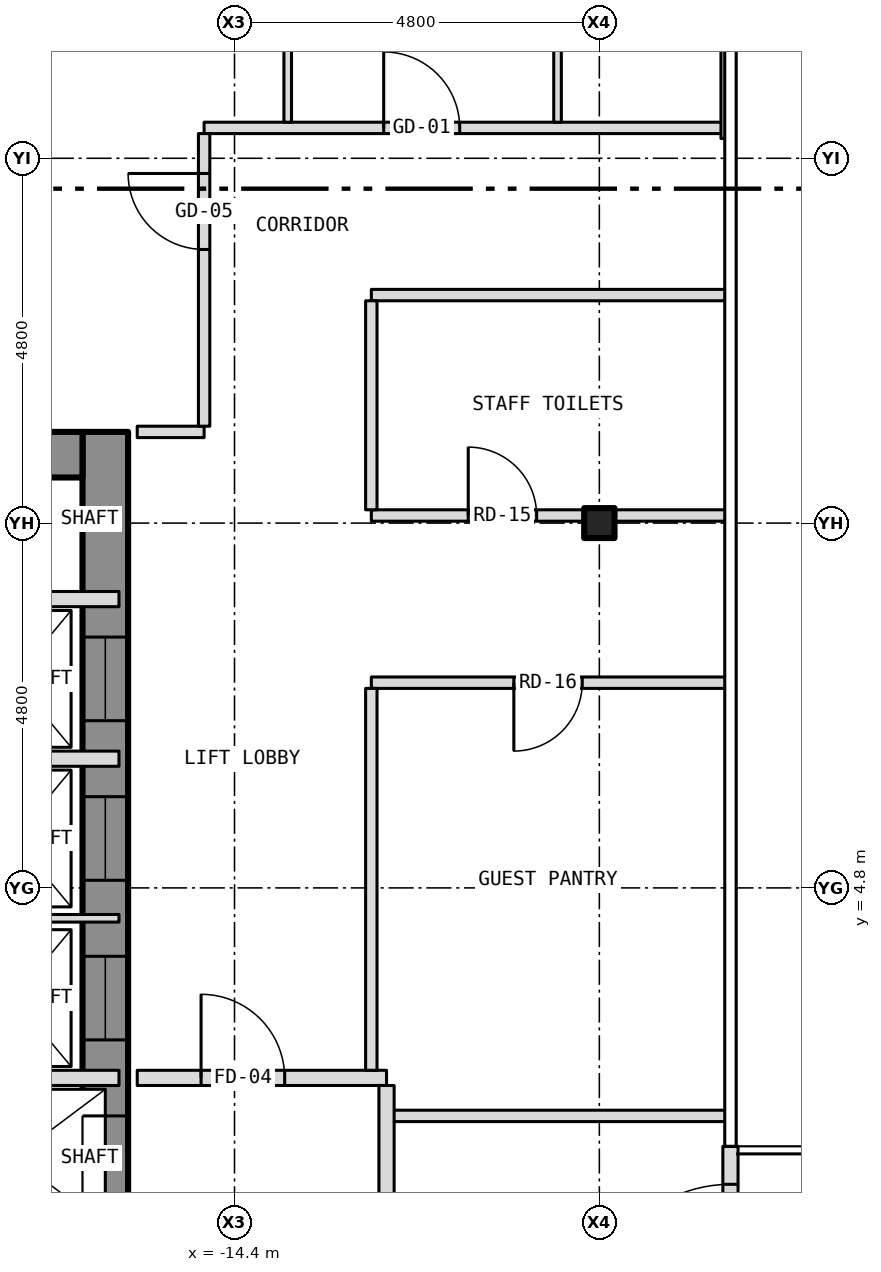
"""IFC4 building model, lengths in metres.
Left out: names, types, materials, properties, quantities, classifications, styles, units other than length and angle.
Written with IfcOpenShell. Run it as: python <this file> out.ifc"""

import sys

from ifc_helpers import new_model, si_unit, direction, frame, frame_2d, origin, origin_2d, place, context, subcontext, project, spatial, rectangle, i_section, extrude, element, fill, save


model = new_model("IFC4")
c1 = context("Model", 3, precision=1e-05, world=origin(), true_north=direction((0.0, 1.0)))
c2 = subcontext(c1, "Body", "Model", "MODEL_VIEW")
j1 = project(units=[si_unit("LENGTHUNIT", "METRE"), si_unit("PLANEANGLEUNIT", "RADIAN")], contexts=[c1])
p1 = place(None, origin())
s1 = spatial("IfcSite", under=j1, at=p1, CompositionType="ELEMENT")
p2 = place(p1, origin())
s2 = spatial("IfcBuilding", under=s1, at=p2, CompositionType="ELEMENT")
p3 = place(p2, frame((0.0, 0.0, 134.5)))
s3 = spatial("IfcBuildingStorey", under=s2, at=p3, CompositionType="ELEMENT", Elevation=134.5)
p4 = place(p3, frame((-9.6, 9.6, -0.15), z_axis=(0.0, 0.0, 1.0), x_axis=(1.0, 0.0, 0.0)))
e1 = element("IfcColumn", 1, at=p4, inside=s3, PredefinedType="COLUMN", context=c2, shape_type="SweptSolid", body=[
    extrude(i_section(OverallWidth=0.399, OverallDepth=0.394, WebThickness=0.023, FlangeThickness=0.037, at=origin_2d()), origin(), (0.0, 0.0, 1.0), 3.35),
])
p5 = place(p3, frame((-16.1, -10.8, 0.0), z_axis=(0.0, 0.0, 1.0), x_axis=(0.0, 1.0, 0.0)))
e2 = element("IfcWall", 2, at=p5, inside=s3, PredefinedType="SHEAR", context=c2, shape_type="SweptSolid", body=[
    extrude(rectangle(XDim=21.6, YDim=0.6, at=frame_2d((10.8, 0.0))), origin(), (0.0, 0.0, 1.0), 2.9),
])
p6 = place(p5, frame((9.4, 0.0, 0.0)))
e3 = element("IfcOpeningElement", 3, at=p6, cuts=e2, PredefinedType="OPENING", context=c2, shape_type="SweptSolid", body=[
    extrude(rectangle(XDim=1.1, YDim=2.1, at=frame_2d((0.55, 1.05))), frame((0.0, 0.312, 0.0), z_axis=(0.0, -1.0, 0.0), x_axis=(1.0, 0.0, 0.0)), (0.0, 0.0, 1.0), 0.624),
])
p7 = place(p5, frame((11.5, 0.0, 0.0)))
e4 = element("IfcOpeningElement", 4, at=p7, cuts=e2, PredefinedType="OPENING", context=c2, shape_type="SweptSolid", body=[
    extrude(rectangle(XDim=1.1, YDim=2.1, at=frame_2d((0.55, 1.05))), frame((0.0, 0.312, 0.0), z_axis=(0.0, -1.0, 0.0), x_axis=(1.0, 0.0, 0.0)), (0.0, 0.0, 1.0), 0.624),
])
p8 = place(p5, frame((13.6, 0.0, 0.0)))
e5 = element("IfcOpeningElement", 5, at=p8, cuts=e2, PredefinedType="OPENING", context=c2, shape_type="SweptSolid", body=[
    extrude(rectangle(XDim=1.1, YDim=2.1, at=frame_2d((0.55, 1.05))), frame((0.0, 0.312, 0.0), z_axis=(0.0, -1.0, 0.0), x_axis=(1.0, 0.0, 0.0)), (0.0, 0.0, 1.0), 0.624),
])
p9 = place(p5, frame((15.7, 0.0, 0.0)))
e6 = element("IfcOpeningElement", 6, at=p9, cuts=e2, PredefinedType="OPENING", context=c2, shape_type="SweptSolid", body=[
    extrude(rectangle(XDim=1.1, YDim=2.1, at=frame_2d((0.55, 1.05))), frame((0.0, 0.312, 0.0), z_axis=(0.0, -1.0, 0.0), x_axis=(1.0, 0.0, 0.0)), (0.0, 0.0, 1.0), 0.624),
])
p10 = place(p5, frame((17.8, 0.0, 0.0)))
e7 = element("IfcOpeningElement", 7, at=p10, cuts=e2, PredefinedType="OPENING", context=c2, shape_type="SweptSolid", body=[
    extrude(rectangle(XDim=1.1, YDim=2.1, at=frame_2d((0.55, 1.05))), frame((0.0, 0.312, 0.0), z_axis=(0.0, -1.0, 0.0), x_axis=(1.0, 0.0, 0.0)), (0.0, 0.0, 1.0), 0.624),
])
p11 = place(p5, frame((0.758, 0.0, 0.0)))
e8 = element("IfcOpeningElement", 8, at=p11, cuts=e2, PredefinedType="OPENING", context=c2, shape_type="SweptSolid", body=[
    extrude(rectangle(XDim=1.1, YDim=2.1, at=frame_2d((0.55, 1.05))), frame((0.0, 0.312, 0.0), z_axis=(0.0, -1.0, 0.0), x_axis=(1.0, 0.0, 0.0)), (0.0, 0.0, 1.0), 0.624),
])
p12 = place(p5, frame((7.5, 0.0, 0.0)))
e9 = element("IfcOpeningElement", 9, at=p12, cuts=e2, PredefinedType="OPENING", context=c2, shape_type="SweptSolid", body=[
    extrude(rectangle(XDim=1.1, YDim=2.1, at=frame_2d((0.55, 1.05))), frame((0.0, 0.312, 0.0), z_axis=(0.0, -1.0, 0.0), x_axis=(1.0, 0.0, 0.0)), (0.0, 0.0, 1.0), 0.624),
])
p13 = place(p3, frame((-22.2, 10.5, 0.0), z_axis=(0.0, 0.0, 1.0), x_axis=(1.0, 0.0, 0.0)))
e10 = element("IfcWall", 10, at=p13, inside=s3, PredefinedType="SHEAR", context=c2, shape_type="SweptSolid", body=[
    extrude(rectangle(XDim=5.8, YDim=0.6, at=frame_2d((2.9, 0.0))), origin(), (0.0, 0.0, 1.0), 2.9),
])
p14 = place(p3, frame((-7.875, -1.4, 0.0), z_axis=(0.0, 0.0, 1.0), x_axis=(0.0, 1.0, 0.0)))
e11 = element("IfcWall", 11, at=p14, inside=s3, PredefinedType="SOLIDWALL", context=c2, shape_type="SweptSolid", body=[
    extrude(rectangle(XDim=2.8, YDim=0.2, at=frame_2d((1.4, 0.0))), origin(), (0.0, 0.0, 1.0), 3.5),
])
p15 = place(p14, frame((0.5, 0.0, 0.0)))
e12 = element("IfcOpeningElement", 12, at=p15, cuts=e11, PredefinedType="OPENING", context=c2, shape_type="SweptSolid", body=[
    extrude(rectangle(XDim=1.8, YDim=2.1, at=frame_2d((0.9, 1.05))), frame((0.0, 0.112, 0.0), z_axis=(0.0, -1.0, 0.0), x_axis=(1.0, 0.0, 0.0)), (0.0, 0.0, 1.0), 0.224),
])
p16 = place(p3, frame((-12.4, 1.8, 0.0), z_axis=(0.0, 0.0, 1.0), x_axis=(1.0, 0.0, 0.0)))
e13 = element("IfcWall", 13, at=p16, inside=s3, PredefinedType="PARTITIONING", context=c2, shape_type="SweptSolid", body=[
    extrude(rectangle(XDim=4.48, YDim=0.15, at=frame_2d((2.24, 0.0))), origin(), (0.0, 0.0, 1.0), 3.2),
])
p17 = place(p3, frame((-18.8, 2.3, 0.0), z_axis=(0.0, 0.0, 1.0), x_axis=(1.0, 0.0, 0.0)))
e14 = element("IfcWall", 14, at=p17, inside=s3, PredefinedType="PARTITIONING", context=c2, shape_type="SweptSolid", body=[
    extrude(rectangle(XDim=2.88, YDim=0.2, at=frame_2d((1.44, 0.0))), origin(), (0.0, 0.0, 1.0), 2.9),
])
p18 = place(p3, frame((-15.68, 2.3, 0.0), z_axis=(0.0, 0.0, 1.0), x_axis=(1.0, 0.0, 0.0)))
e15 = element("IfcWall", 15, at=p18, inside=s3, PredefinedType="PARTITIONING", context=c2, shape_type="SweptSolid", body=[
    extrude(rectangle(XDim=3.28, YDim=0.2, at=frame_2d((1.64, 0.0))), origin(), (0.0, 0.0, 1.0), 3.2),
])
p19 = place(p18, frame((0.84, 0.0, 0.0)))
e16 = element("IfcOpeningElement", 16, at=p19, cuts=e15, PredefinedType="OPENING", context=c2, shape_type="SweptSolid", body=[
    extrude(rectangle(XDim=1.1, YDim=2.1, at=frame_2d((0.55, 1.05))), frame((0.0, 0.112, 0.0), z_axis=(0.0, -1.0, 0.0), x_axis=(1.0, 0.0, 0.0)), (0.0, 0.0, 1.0), 0.224),
])
p20 = place(p3, frame((-22.68, 4.4, 0.0), z_axis=(0.0, 0.0, 1.0), x_axis=(1.0, 0.0, 0.0)))
e17 = element("IfcWall", 17, at=p20, inside=s3, PredefinedType="PARTITIONING", context=c2, shape_type="SweptSolid", body=[
    extrude(rectangle(XDim=6.76, YDim=0.1, at=frame_2d((3.38, 0.0))), origin(), (0.0, 0.0, 1.0), 2.9),
])
p21 = place(p20, frame((1.43, 0.0, 0.0)))
e18 = element("IfcOpeningElement", 18, at=p21, cuts=e17, PredefinedType="OPENING", context=c2, shape_type="SweptSolid", body=[
    extrude(rectangle(XDim=0.9, YDim=2.1, at=frame_2d((0.45, 1.05))), frame((0.0, 0.062, 0.0), z_axis=(0.0, -1.0, 0.0), x_axis=(1.0, 0.0, 0.0)), (0.0, 0.0, 1.0), 0.124),
])
p22 = place(p3, frame((-18.8, 6.5, 0.0), z_axis=(0.0, 0.0, 1.0), x_axis=(1.0, 0.0, 0.0)))
e19 = element("IfcWall", 19, at=p22, inside=s3, PredefinedType="PARTITIONING", context=c2, shape_type="SweptSolid", body=[
    extrude(rectangle(XDim=2.88, YDim=0.2, at=frame_2d((1.44, 0.0))), origin(), (0.0, 0.0, 1.0), 2.9),
])
p23 = place(p3, frame((-12.6, 7.5, 0.0), z_axis=(0.0, 0.0, 1.0), x_axis=(1.0, 0.0, 0.0)))
e20 = element("IfcWall", 20, at=p23, inside=s3, PredefinedType="PARTITIONING", context=c2, shape_type="SweptSolid", body=[
    extrude(rectangle(XDim=4.68, YDim=0.15, at=frame_2d((2.34, 0.0))), origin(), (0.0, 0.0, 1.0), 3.2),
])
p24 = place(p23, frame((1.875, 0.0, 0.0)))
e21 = element("IfcOpeningElement", 21, at=p24, cuts=e20, PredefinedType="OPENING", context=c2, shape_type="SweptSolid", body=[
    extrude(rectangle(XDim=0.9, YDim=2.1, at=frame_2d((0.45, 1.05))), frame((0.0, 0.087, 0.0), z_axis=(0.0, -1.0, 0.0), x_axis=(1.0, 0.0, 0.0)), (0.0, 0.0, 1.0), 0.174),
])
p25 = place(p3, frame((-18.8, 8.6, 0.0), z_axis=(0.0, 0.0, 1.0), x_axis=(1.0, 0.0, 0.0)))
e22 = element("IfcWall", 22, at=p25, inside=s3, PredefinedType="PARTITIONING", context=c2, shape_type="SweptSolid", body=[
    extrude(rectangle(XDim=2.88, YDim=0.2, at=frame_2d((1.44, 0.0))), origin(), (0.0, 0.0, 1.0), 2.9),
])
p26 = place(p3, frame((-12.6, 9.7, 0.0), z_axis=(0.0, 0.0, 1.0), x_axis=(1.0, 0.0, 0.0)))
e23 = element("IfcWall", 23, at=p26, inside=s3, PredefinedType="PARTITIONING", context=c2, shape_type="SweptSolid", body=[
    extrude(rectangle(XDim=2.801, YDim=0.15, at=frame_2d((1.4, 0.0))), origin(), (0.0, 0.0, 1.0), 2.578),
])
p27 = place(p26, frame((1.275, 0.0, 0.0)))
e24 = element("IfcOpeningElement", 24, at=p27, cuts=e23, PredefinedType="OPENING", context=c2, shape_type="SweptSolid", body=[
    extrude(rectangle(XDim=0.9, YDim=2.1, at=frame_2d((0.45, 1.05))), frame((0.0, 0.087, 0.0), z_axis=(0.0, -1.0, 0.0), x_axis=(1.0, 0.0, 0.0)), (0.0, 0.0, 1.0), 0.174),
])
p28 = place(p3, frame((-9.799, 9.7, 0.0), z_axis=(0.0, 0.0, 1.0), x_axis=(1.0, 0.0, 0.0)))
e25 = element("IfcWall", 25, at=p28, inside=s3, PredefinedType="PARTITIONING", context=c2, shape_type="SweptSolid", body=[
    extrude(rectangle(XDim=1.879, YDim=0.15, at=frame_2d((0.94, 0.0))), origin(), (0.0, 0.0, 1.0), 3.2),
])
p29 = place(p3, frame((-15.68, 10.8, 0.0), z_axis=(0.0, 0.0, 1.0), x_axis=(1.0, 0.0, 0.0)))
e26 = element("IfcWall", 26, at=p29, inside=s3, PredefinedType="PARTITIONING", context=c2, shape_type="SweptSolid", body=[
    extrude(rectangle(XDim=0.88, YDim=0.15, at=frame_2d((0.44, 0.0))), origin(), (0.0, 0.0, 1.0), 3.2),
])
p30 = place(p3, frame((-12.6, 12.6, 0.0), z_axis=(0.0, 0.0, 1.0), x_axis=(1.0, 0.0, 0.0)))
e27 = element("IfcWall", 27, at=p30, inside=s3, PredefinedType="PARTITIONING", context=c2, shape_type="SweptSolid", body=[
    extrude(rectangle(XDim=4.68, YDim=0.15, at=frame_2d((2.34, 0.0))), origin(), (0.0, 0.0, 1.0), 3.2),
])
p31 = place(p3, frame((-14.8, 14.8, 0.0), z_axis=(0.0, 0.0, 1.0), x_axis=(1.0, 0.0, 0.0)))
e28 = element("IfcWall", 28, at=p31, inside=s3, PredefinedType="PARTITIONING", context=c2, shape_type="SweptSolid", body=[
    extrude(rectangle(XDim=6.85, YDim=0.15, at=frame_2d((3.425, 0.0))), origin(), (0.0, 0.0, 1.0), 3.2),
])
p32 = place(p31, frame((2.363, 0.0, 0.0)))
e29 = element("IfcOpeningElement", 29, at=p32, cuts=e28, PredefinedType="OPENING", context=c2, shape_type="SweptSolid", body=[
    extrude(rectangle(XDim=1.0, YDim=2.1, at=frame_2d((0.5, 1.05))), frame((0.0, 0.087, 0.0), z_axis=(0.0, -1.0, 0.0), x_axis=(1.0, 0.0, 0.0)), (0.0, 0.0, 1.0), 0.174),
])
p33 = place(p3, frame((-14.8, 10.875, 0.0), z_axis=(0.0, 0.0, 1.0), x_axis=(0.0, 1.0, 0.0)))
e30 = element("IfcWall", 30, at=p33, inside=s3, PredefinedType="PARTITIONING", context=c2, shape_type="SweptSolid", body=[
    extrude(rectangle(XDim=3.85, YDim=0.15, at=frame_2d((1.925, 0.0))), origin(), (0.0, 0.0, 1.0), 3.2),
])
p34 = place(p33, frame((2.325, 0.0, 0.0)))
e31 = element("IfcOpeningElement", 31, at=p34, cuts=e30, PredefinedType="OPENING", context=c2, shape_type="SweptSolid", body=[
    extrude(rectangle(XDim=1.0, YDim=2.1, at=frame_2d((0.5, 1.05))), frame((0.0, 0.087, 0.0), z_axis=(0.0, -1.0, 0.0), x_axis=(1.0, 0.0, 0.0)), (0.0, 0.0, 1.0), 0.174),
])
p35 = place(p3, frame((-13.7, 14.875, 0.0), z_axis=(0.0, 0.0, 1.0), x_axis=(0.0, 1.0, 0.0)))
e32 = element("IfcWall", 32, at=p35, inside=s3, PredefinedType="PARTITIONING", context=c2, shape_type="SweptSolid", body=[
    extrude(rectangle(XDim=7.805, YDim=0.1, at=frame_2d((3.902, 0.0))), origin(), (0.0, 0.0, 1.0), 3.2),
])
p36 = place(p3, frame((-12.6, 2.4, 0.0), z_axis=(0.0, 0.0, 1.0), x_axis=(0.0, 1.0, 0.0)))
e33 = element("IfcWall", 33, at=p36, inside=s3, PredefinedType="PARTITIONING", context=c2, shape_type="SweptSolid", body=[
    extrude(rectangle(XDim=5.025, YDim=0.15, at=frame_2d((2.513, 0.0))), origin(), (0.0, 0.0, 1.0), 3.2),
])
p37 = place(p3, frame((-12.6, 9.775, 0.0), z_axis=(0.0, 0.0, 1.0), x_axis=(0.0, 1.0, 0.0)))
e34 = element("IfcWall", 34, at=p37, inside=s3, PredefinedType="PARTITIONING", context=c2, shape_type="SweptSolid", body=[
    extrude(rectangle(XDim=2.75, YDim=0.15, at=frame_2d((1.375, 0.0))), origin(), (0.0, 0.0, 1.0), 3.2),
])
p38 = place(p3, frame((-12.4, -1.8, 0.0), z_axis=(0.0, 0.0, 1.0), x_axis=(0.0, 1.0, 0.0)))
e35 = element("IfcWall", 35, at=p38, inside=s3, PredefinedType="PARTITIONING", context=c2, shape_type="SweptSolid", body=[
    extrude(rectangle(XDim=4.0, YDim=0.2, at=frame_2d((2.0, 0.0))), origin(), (0.0, 0.0, 1.0), 3.2),
])
p39 = place(p38, frame((1.25, 0.0, 0.0)))
e36 = element("IfcOpeningElement", 36, at=p39, cuts=e35, PredefinedType="OPENING", context=c2, shape_type="SweptSolid", body=[
    extrude(rectangle(XDim=1.1, YDim=2.1, at=frame_2d((0.55, 1.05))), frame((0.0, 0.112, 0.0), z_axis=(0.0, -1.0, 0.0), x_axis=(1.0, 0.0, 0.0)), (0.0, 0.0, 1.0), 0.224),
])
p40 = place(p3, frame((-10.15, 14.875, 0.0), z_axis=(0.0, 0.0, 1.0), x_axis=(0.0, 1.0, 0.0)))
e37 = element("IfcWall", 37, at=p40, inside=s3, PredefinedType="PARTITIONING", context=c2, shape_type="SweptSolid", body=[
    extrude(rectangle(XDim=3.075, YDim=0.1, at=frame_2d((1.538, 0.0))), origin(), (0.0, 0.0, 1.0), 3.2),
])
p41 = place(p40, frame((1.971, 0.0, 0.0)))
e38 = element("IfcOpeningElement", 38, at=p41, cuts=e37, PredefinedType="OPENING", context=c2, shape_type="SweptSolid", body=[
    extrude(rectangle(XDim=0.9, YDim=2.1, at=frame_2d((0.45, 1.05))), frame((0.0, 0.062, 0.0), z_axis=(0.0, -1.0, 0.0), x_axis=(1.0, 0.0, 0.0)), (0.0, 0.0, 1.0), 0.124),
])
p42 = place(p3, frame((-7.95, 14.66, 0.0), z_axis=(0.0, 0.0, 1.0), x_axis=(0.0, 1.0, 0.0)))
e39 = element("IfcWall", 39, at=p42, inside=s3, PredefinedType="PARTITIONING", context=c2, shape_type="SweptSolid", body=[
    extrude(rectangle(XDim=3.48, YDim=0.1, at=frame_2d((1.74, 0.0))), origin(), (0.0, 0.0, 1.0), 3.2),
])
p43 = place(p15, origin())
e40 = element("IfcDoor", 40, at=p43, inside=s3, OperationType="DOUBLE_DOOR_DOUBLE_SWING", PredefinedType="DOOR", context=c2, shape_type="SweptSolid", body=[
    extrude(rectangle(XDim=1.8, YDim=2.1, at=frame_2d((0.9, 1.05))), frame((0.0, 0.025, 0.0), z_axis=(0.0, -1.0, 0.0), x_axis=(1.0, 0.0, 0.0)), (0.0, 0.0, 1.0), 0.05),
])
fill(e12, e40)
p44 = place(p7, origin())
e41 = element("IfcDoor", 41, at=p44, inside=s3, OperationType="SLIDING_TO_LEFT", PredefinedType="DOOR", context=c2, shape_type="SweptSolid", body=[
    extrude(rectangle(XDim=1.1, YDim=2.1, at=frame_2d((0.55, 1.05))), frame((0.0, 0.025, 0.0), z_axis=(0.0, -1.0, 0.0), x_axis=(1.0, 0.0, 0.0)), (0.0, 0.0, 1.0), 0.05),
])
fill(e4, e41)
p45 = place(p8, origin())
e42 = element("IfcDoor", 42, at=p45, inside=s3, OperationType="SLIDING_TO_LEFT", PredefinedType="DOOR", context=c2, shape_type="SweptSolid", body=[
    extrude(rectangle(XDim=1.1, YDim=2.1, at=frame_2d((0.55, 1.05))), frame((0.0, 0.025, 0.0), z_axis=(0.0, -1.0, 0.0), x_axis=(1.0, 0.0, 0.0)), (0.0, 0.0, 1.0), 0.05),
])
fill(e5, e42)
p46 = place(p9, origin())
e43 = element("IfcDoor", 43, at=p46, inside=s3, OperationType="SLIDING_TO_LEFT", PredefinedType="DOOR", context=c2, shape_type="SweptSolid", body=[
    extrude(rectangle(XDim=1.1, YDim=2.1, at=frame_2d((0.55, 1.05))), frame((0.0, 0.025, 0.0), z_axis=(0.0, -1.0, 0.0), x_axis=(1.0, 0.0, 0.0)), (0.0, 0.0, 1.0), 0.05),
])
fill(e6, e43)
p47 = place(p10, origin())
e44 = element("IfcDoor", 44, at=p47, inside=s3, OperationType="SLIDING_TO_LEFT", PredefinedType="DOOR", context=c2, shape_type="SweptSolid", body=[
    extrude(rectangle(XDim=1.1, YDim=2.1, at=frame_2d((0.55, 1.05))), frame((0.0, 0.025, 0.0), z_axis=(0.0, -1.0, 0.0), x_axis=(1.0, 0.0, 0.0)), (0.0, 0.0, 1.0), 0.05),
])
fill(e7, e44)
p48 = place(p19, origin())
e45 = element("IfcDoor", 45, at=p48, inside=s3, OperationType="SINGLE_SWING_LEFT", PredefinedType="DOOR", context=c2, shape_type="SweptSolid", body=[
    extrude(rectangle(XDim=1.1, YDim=2.1, at=frame_2d((0.55, 1.05))), frame((0.0, 0.025, 0.0), z_axis=(0.0, -1.0, 0.0), x_axis=(1.0, 0.0, 0.0)), (0.0, 0.0, 1.0), 0.05),
])
fill(e16, e45)
p49 = place(p32, origin())
e46 = element("IfcDoor", 46, at=p49, inside=s3, OperationType="SINGLE_SWING_LEFT", PredefinedType="DOOR", context=c2, shape_type="SweptSolid", body=[
    extrude(rectangle(XDim=1.0, YDim=2.1, at=frame_2d((0.5, 1.05))), frame((0.0, 0.025, 0.0), z_axis=(0.0, -1.0, 0.0), x_axis=(1.0, 0.0, 0.0)), (0.0, 0.0, 1.0), 0.05),
])
fill(e29, e46)
p50 = place(p34, origin())
e47 = element("IfcDoor", 47, at=p50, inside=s3, OperationType="SINGLE_SWING_RIGHT", PredefinedType="DOOR", context=c2, shape_type="SweptSolid", body=[
    extrude(rectangle(XDim=1.0, YDim=2.1, at=frame_2d((0.5, 1.05))), frame((0.0, 0.025, 0.0), z_axis=(0.0, -1.0, 0.0), x_axis=(1.0, 0.0, 0.0)), (0.0, 0.0, 1.0), 0.05),
])
fill(e31, e47)
p51 = place(p27, origin())
e48 = element("IfcDoor", 48, at=p51, inside=s3, OperationType="SINGLE_SWING_LEFT", PredefinedType="DOOR", context=c2, shape_type="SweptSolid", body=[
    extrude(rectangle(XDim=0.9, YDim=2.1, at=frame_2d((0.45, 1.05))), frame((0.0, 0.025, 0.0), z_axis=(0.0, -1.0, 0.0), x_axis=(1.0, 0.0, 0.0)), (0.0, 0.0, 1.0), 0.05),
])
fill(e24, e48)
p52 = place(p24, origin())
e49 = element("IfcDoor", 49, at=p52, inside=s3, OperationType="SINGLE_SWING_LEFT", PredefinedType="DOOR", context=c2, shape_type="SweptSolid", body=[
    extrude(rectangle(XDim=0.9, YDim=2.1, at=frame_2d((0.45, 1.05))), frame((0.0, 0.025, 0.0), z_axis=(0.0, -1.0, 0.0), x_axis=(1.0, 0.0, 0.0)), (0.0, 0.0, 1.0), 0.05),
])
fill(e21, e49)
save(model, sys.argv[1])
